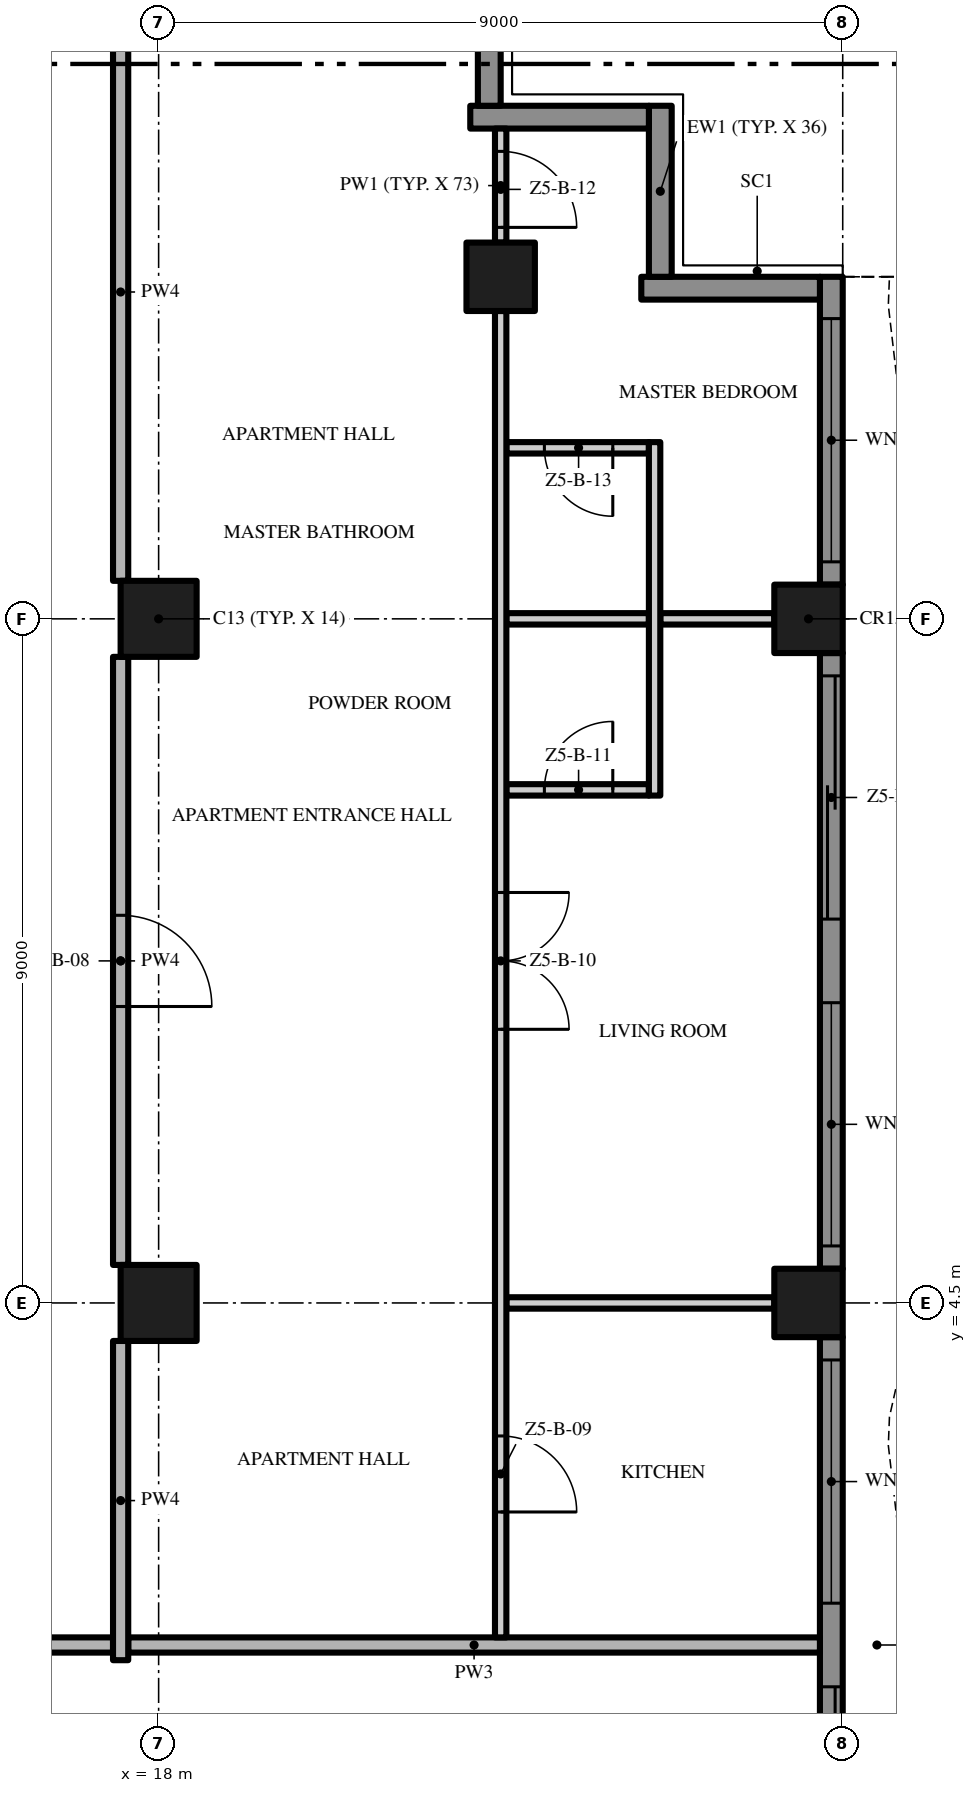
"""IFC4 building model, lengths in metres.
Left out: names, types, materials, properties, quantities, classifications, styles, units other than length and angle.
Written with IfcOpenShell. Run it as: python <this file> out.ifc"""

import sys

from ifc_helpers import new_model, si_unit, direction, frame, frame_2d, origin, origin_2d, place, context, subcontext, project, spatial, polyline, rectangle, outline, extrude, element, fill, save


model = new_model("IFC4")
c1 = context("Model", 3, precision=1e-05, world=origin(), true_north=direction((0.0, 1.0)))
c2 = subcontext(c1, "Body", "Model", "MODEL_VIEW")
j1 = project(units=[si_unit("LENGTHUNIT", "METRE"), si_unit("PLANEANGLEUNIT", "RADIAN")], contexts=[c1])
p1 = place(None, origin())
s1 = spatial("IfcSite", under=j1, at=p1, CompositionType="ELEMENT")
p2 = place(p1, origin())
s2 = spatial("IfcBuilding", under=s1, at=p2, CompositionType="ELEMENT")
p3 = place(p2, frame((0.0, 0.0, 254.0)))
s3 = spatial("IfcBuildingStorey", under=s2, at=p3, CompositionType="ELEMENT", Elevation=254.0)
for number, where, z_axis, x_axis in (
    (1, (18.0, 13.5, 0.0), (0.0, 0.0, 1.0), (1.0, 0.0, 0.0)),
    (2, (18.0, 4.5, 0.0), (0.0, 0.0, 1.0), (1.0, 0.0, 0.0)),
):
    element("IfcColumn", number, at=place(p3, frame(where, z_axis=z_axis, x_axis=x_axis)), inside=s3, PredefinedType="COLUMN", context=c2, shape_type="SweptSolid", body=[
        extrude(rectangle(XDim=1.0, YDim=1.0, at=origin_2d()), origin(), (0.0, 0.0, 1.0), 3.5),
    ])
for number, where, z_axis, x_axis in (
    (3, (26.55, 13.5, 0.0), (0.0, 0.0, 1.0), (1.0, 0.0, 0.0)),
    (4, (22.5, 18.0, 0.0), (0.0, 0.0, 1.0), (1.0, 0.0, 0.0)),
    (5, (26.55, 4.5, 0.0), (0.0, 0.0, 1.0), (1.0, 0.0, 0.0)),
):
    element("IfcColumn", number, at=place(p3, frame(where, z_axis=z_axis, x_axis=x_axis)), inside=s3, PredefinedType="COLUMN", context=c2, shape_type="SweptSolid", body=[
        extrude(rectangle(XDim=0.9, YDim=0.9, at=origin_2d()), origin(), (0.0, 0.0, 1.0), 3.5),
    ])
p4 = place(p3, frame((26.85, 4.05, 0.0), z_axis=(0.0, 0.0, 1.0), x_axis=(0.0, -1.0, 0.0)))
e6 = element("IfcWall", 6, at=p4, inside=s3, PredefinedType="SOLIDWALL", context=c2, shape_type="SweptSolid", body=[
    extrude(rectangle(XDim=8.1, YDim=0.3, at=frame_2d((4.05, 0.0))), origin(), (0.0, 0.0, 1.0), 3.5),
])
p5 = place(p4, frame((4.6, 0.0, 0.0)))
e7 = element("IfcOpeningElement", 7, at=p5, cuts=e6, PredefinedType="OPENING", context=c2, shape_type="SweptSolid", body=[
    extrude(rectangle(XDim=3.2, YDim=2.4, at=frame_2d((1.6, 1.2))), frame((0.0, 0.16, 0.0), z_axis=(0.0, -1.0, 0.0), x_axis=(1.0, 0.0, 0.0)), (0.0, 0.0, 1.0), 0.32),
])
p6 = place(p4, frame((0.3, 0.0, 0.45)))
e8 = element("IfcOpeningElement", 8, at=p6, cuts=e6, PredefinedType="OPENING", context=c2, shape_type="SweptSolid", body=[
    extrude(rectangle(XDim=3.2, YDim=2.65, at=frame_2d((1.6, 1.325))), frame((0.0, 0.16, 0.0), z_axis=(0.0, -1.0, 0.0), x_axis=(1.0, 0.0, 0.0)), (0.0, 0.0, 1.0), 0.32),
])
p7 = place(p3, frame((26.85, 13.05, 0.0), z_axis=(0.0, 0.0, 1.0), x_axis=(0.0, -1.0, 0.0)))
e9 = element("IfcWall", 9, at=p7, inside=s3, PredefinedType="SOLIDWALL", context=c2, shape_type="SweptSolid", body=[
    extrude(rectangle(XDim=8.1, YDim=0.3, at=frame_2d((4.05, 0.0))), origin(), (0.0, 0.0, 1.0), 3.5),
])
p8 = place(p7, frame((4.6, 0.0, 0.45)))
e10 = element("IfcOpeningElement", 10, at=p8, cuts=e9, PredefinedType="OPENING", context=c2, shape_type="SweptSolid", body=[
    extrude(rectangle(XDim=3.2, YDim=2.65, at=frame_2d((1.6, 1.325))), frame((0.0, 0.16, 0.0), z_axis=(0.0, -1.0, 0.0), x_axis=(1.0, 0.0, 0.0)), (0.0, 0.0, 1.0), 0.32),
])
p9 = place(p7, frame((0.3, 0.0, 0.0)))
e11 = element("IfcOpeningElement", 11, at=p9, cuts=e9, PredefinedType="OPENING", context=c2, shape_type="SweptSolid", body=[
    extrude(rectangle(XDim=3.2, YDim=2.4, at=frame_2d((1.6, 1.2))), frame((0.0, 0.16, 0.0), z_axis=(0.0, -1.0, 0.0), x_axis=(1.0, 0.0, 0.0)), (0.0, 0.0, 1.0), 0.32),
])
p10 = place(p3, frame((26.85, 18.0, 0.0), z_axis=(0.0, 0.0, 1.0), x_axis=(0.0, -1.0, 0.0)))
e12 = element("IfcWall", 12, at=p10, inside=s3, PredefinedType="SOLIDWALL", context=c2, shape_type="SweptSolid", body=[
    extrude(rectangle(XDim=4.05, YDim=0.3, at=frame_2d((2.025, 0.0))), origin(), (0.0, 0.0, 1.0), 3.5),
])
p11 = place(p10, frame((0.55, 0.0, 0.45)))
e13 = element("IfcOpeningElement", 13, at=p11, cuts=e12, PredefinedType="OPENING", context=c2, shape_type="SweptSolid", body=[
    extrude(rectangle(XDim=3.2, YDim=2.65, at=frame_2d((1.6, 1.325))), frame((0.0, 0.16, 0.0), z_axis=(0.0, -1.0, 0.0), x_axis=(1.0, 0.0, 0.0)), (0.0, 0.0, 1.0), 0.32),
])
p12 = place(p3, frame((24.35, 17.85, 0.0), z_axis=(0.0, 0.0, 1.0), x_axis=(1.0, 0.0, 0.0)))
e14 = element("IfcWall", 14, at=p12, inside=s3, PredefinedType="SOLIDWALL", context=c2, shape_type="SweptSolid", body=[
    extrude(rectangle(XDim=2.35, YDim=0.3, at=frame_2d((1.175, 0.0))), origin(), (0.0, 0.0, 1.0), 3.5),
])
p13 = place(p3, frame((24.6, 20.25, 0.0), z_axis=(0.0, 0.0, 1.0), x_axis=(0.0, -1.0, 0.0)))
e15 = element("IfcWall", 15, at=p13, inside=s3, PredefinedType="SOLIDWALL", context=c2, shape_type="SweptSolid", body=[
    extrude(rectangle(XDim=2.25, YDim=0.3, at=frame_2d((1.125, 0.0))), origin(), (0.0, 0.0, 1.0), 3.5),
])
p14 = place(p3, frame((22.1, 20.1, 0.0), z_axis=(0.0, 0.0, 1.0), x_axis=(1.0, 0.0, 0.0)))
e16 = element("IfcWall", 16, at=p14, inside=s3, PredefinedType="SOLIDWALL", context=c2, shape_type="SweptSolid", body=[
    extrude(rectangle(XDim=2.35, YDim=0.3, at=frame_2d((1.175, 0.0))), origin(), (0.0, 0.0, 1.0), 3.5),
])
p15 = place(p3, frame((22.35, 22.5, 0.0), z_axis=(0.0, 0.0, 1.0), x_axis=(0.0, -1.0, 0.0)))
e17 = element("IfcWall", 17, at=p15, inside=s3, PredefinedType="SOLIDWALL", context=c2, shape_type="SweptSolid", body=[
    extrude(rectangle(XDim=2.25, YDim=0.3, at=frame_2d((1.125, 0.0))), origin(), (0.0, 0.0, 1.0), 3.5),
])
p16 = place(p3, origin())
e18 = element("IfcWall", 18, at=p16, inside=s3, PredefinedType="USERDEFINED", context=c2, shape_type="SweptSolid", body=[
    extrude(outline(polyline([(29.649, -18.0), (28.988, -16.5), (28.255, -15.0), (27.731, -13.5), (27.6, -12.375), (27.615, -12.0), (27.951, -10.5), (28.612, -9.0), (29.345, -7.5), (29.869, -6.0), (30.0, -4.875), (29.985, -4.5), (29.649, -3.0), (28.988, -1.5), (28.255, 0.0), (27.731, 1.5), (27.6, 2.625), (27.615, 3.0), (27.951, 4.5), (28.612, 6.0), (29.345, 7.5), (29.869, 9.0), (30.0, 10.125), (29.985, 10.5), (29.649, 12.0), (28.988, 13.5), (28.255, 15.0), (27.731, 16.5), (27.6, 17.625), (27.615, 18.0), (27.365, 18.01), (27.349, 17.615), (27.486, 16.444), (28.024, 14.904), (28.761, 13.395), (29.41, 11.921), (29.736, 10.467), (29.749, 10.135), (29.624, 9.056), (29.114, 7.596), (28.385, 6.105), (27.713, 4.579), (27.366, 3.033), (27.349, 2.615), (27.486, 1.444), (28.024, -0.096), (28.761, -1.605), (29.41, -3.079), (29.736, -4.533), (29.749, -4.865), (29.624, -5.944), (29.114, -7.404), (28.385, -8.895), (27.713, -10.421), (27.366, -11.967), (27.349, -12.385), (27.486, -13.556), (28.024, -15.096), (28.761, -16.605), (29.42, -18.101), (29.649, -18.0)])), origin(), (0.0, 0.0, 1.0), 0.9),
])
p17 = place(p3, frame((17.4, 0.0, 0.0), z_axis=(0.0, 0.0, 1.0), x_axis=(-1.0, 0.0, 0.0)))
e19 = element("IfcWall", 19, at=p17, inside=s3, PredefinedType="PARTITIONING", context=c2, shape_type="SweptSolid", body=[
    extrude(rectangle(XDim=34.8, YDim=0.2, at=frame_2d((17.4, 0.0))), origin(), (0.0, 0.0, 1.0), 3.5),
])
p18 = place(p17, frame((23.4, 0.0, 0.0)))
e20 = element("IfcOpeningElement", 20, at=p18, cuts=e19, PredefinedType="OPENING", context=c2, shape_type="SweptSolid", body=[
    extrude(rectangle(XDim=1.5, YDim=2.4, at=frame_2d((0.75, 1.2))), frame((0.0, 0.11, 0.0), z_axis=(0.0, -1.0, 0.0), x_axis=(1.0, 0.0, 0.0)), (0.0, 0.0, 1.0), 0.22),
])
p19 = place(p17, frame((5.4, 0.0, 0.0)))
e21 = element("IfcOpeningElement", 21, at=p19, cuts=e19, PredefinedType="OPENING", context=c2, shape_type="SweptSolid", body=[
    extrude(rectangle(XDim=1.5, YDim=2.4, at=frame_2d((0.75, 1.2))), frame((0.0, 0.11, 0.0), z_axis=(0.0, -1.0, 0.0), x_axis=(1.0, 0.0, 0.0)), (0.0, 0.0, 1.0), 0.22),
])
p20 = place(p3, frame((17.6, 0.0, 0.0), z_axis=(0.0, 0.0, 1.0), x_axis=(1.0, 0.0, 0.0)))
e22 = element("IfcWall", 22, at=p20, inside=s3, PredefinedType="PARTITIONING", context=c2, shape_type="SweptSolid", body=[
    extrude(rectangle(XDim=9.1, YDim=0.2, at=frame_2d((4.55, 0.0))), origin(), (0.0, 0.0, 1.0), 3.5),
])
p21 = place(p3, frame((22.575, 4.5, 0.0), z_axis=(0.0, 0.0, 1.0), x_axis=(1.0, 0.0, 0.0)))
e23 = element("IfcWall", 23, at=p21, inside=s3, PredefinedType="PARTITIONING", context=c2, shape_type="SweptSolid", body=[
    extrude(rectangle(XDim=3.525, YDim=0.15, at=frame_2d((1.762, 0.0))), origin(), (0.0, 0.0, 1.0), 3.5),
])
p22 = place(p3, frame((22.575, 11.25, 0.0), z_axis=(0.0, 0.0, 1.0), x_axis=(1.0, 0.0, 0.0)))
e24 = element("IfcWall", 24, at=p22, inside=s3, PredefinedType="PARTITIONING", context=c2, shape_type="SweptSolid", body=[
    extrude(rectangle(XDim=1.875, YDim=0.15, at=frame_2d((0.938, 0.0))), origin(), (0.0, 0.0, 1.0), 3.5),
])
p23 = place(p22, frame((0.5, 0.0, 0.0)))
e25 = element("IfcOpeningElement", 25, at=p23, cuts=e24, PredefinedType="OPENING", context=c2, shape_type="SweptSolid", body=[
    extrude(rectangle(XDim=0.9, YDim=2.1, at=frame_2d((0.45, 1.05))), frame((0.0, 0.085, 0.0), z_axis=(0.0, -1.0, 0.0), x_axis=(1.0, 0.0, 0.0)), (0.0, 0.0, 1.0), 0.17),
])
p24 = place(p3, frame((22.575, 13.5, 0.0), z_axis=(0.0, 0.0, 1.0), x_axis=(1.0, 0.0, 0.0)))
e26 = element("IfcWall", 26, at=p24, inside=s3, PredefinedType="PARTITIONING", context=c2, shape_type="SweptSolid", body=[
    extrude(rectangle(XDim=1.875, YDim=0.15, at=frame_2d((0.938, 0.0))), origin(), (0.0, 0.0, 1.0), 3.5),
])
p25 = place(p3, frame((24.6, 13.5, 0.0), z_axis=(0.0, 0.0, 1.0), x_axis=(1.0, 0.0, 0.0)))
e27 = element("IfcWall", 27, at=p25, inside=s3, PredefinedType="PARTITIONING", context=c2, shape_type="SweptSolid", body=[
    extrude(rectangle(XDim=1.5, YDim=0.15, at=frame_2d((0.75, 0.0))), origin(), (0.0, 0.0, 1.0), 3.5),
])
p26 = place(p3, frame((24.45, 15.75, 0.0), z_axis=(0.0, 0.0, 1.0), x_axis=(-1.0, 0.0, 0.0)))
e28 = element("IfcWall", 28, at=p26, inside=s3, PredefinedType="PARTITIONING", context=c2, shape_type="SweptSolid", body=[
    extrude(rectangle(XDim=1.875, YDim=0.15, at=frame_2d((0.938, 0.0))), origin(), (0.0, 0.0, 1.0), 3.5),
])
p27 = place(p26, frame((0.475, 0.0, 0.0)))
e29 = element("IfcOpeningElement", 29, at=p27, cuts=e28, PredefinedType="OPENING", context=c2, shape_type="SweptSolid", body=[
    extrude(rectangle(XDim=0.9, YDim=2.1, at=frame_2d((0.45, 1.05))), frame((0.0, 0.085, 0.0), z_axis=(0.0, -1.0, 0.0), x_axis=(1.0, 0.0, 0.0)), (0.0, 0.0, 1.0), 0.17),
])
p28 = place(p3, frame((17.5, -0.2, 0.0), z_axis=(0.0, 0.0, 1.0), x_axis=(0.0, 1.0, 0.0)))
e30 = element("IfcWall", 30, at=p28, inside=s3, PredefinedType="PARTITIONING", context=c2, shape_type="SweptSolid", body=[
    extrude(rectangle(XDim=4.2, YDim=0.2, at=frame_2d((2.1, 0.0))), origin(), (0.0, 0.0, 1.0), 3.5),
])
p29 = place(p3, frame((17.5, 13.0, 0.0), z_axis=(0.0, 0.0, 1.0), x_axis=(0.0, -1.0, 0.0)))
e31 = element("IfcWall", 31, at=p29, inside=s3, PredefinedType="PARTITIONING", context=c2, shape_type="SweptSolid", body=[
    extrude(rectangle(XDim=8.0, YDim=0.2, at=frame_2d((4.0, 0.0))), origin(), (0.0, 0.0, 1.0), 3.5),
])
p30 = place(p29, frame((3.4, 0.0, 0.0)))
e32 = element("IfcOpeningElement", 32, at=p30, cuts=e31, PredefinedType="OPENING", context=c2, shape_type="SweptSolid", body=[
    extrude(rectangle(XDim=1.2, YDim=2.4, at=frame_2d((0.6, 1.2))), frame((0.0, 0.11, 0.0), z_axis=(0.0, -1.0, 0.0), x_axis=(1.0, 0.0, 0.0)), (0.0, 0.0, 1.0), 0.22),
])
p31 = place(p3, frame((17.5, 14.0, 0.0), z_axis=(0.0, 0.0, 1.0), x_axis=(0.0, 1.0, 0.0)))
e33 = element("IfcWall", 33, at=p31, inside=s3, PredefinedType="PARTITIONING", context=c2, shape_type="SweptSolid", body=[
    extrude(rectangle(XDim=7.6, YDim=0.2, at=frame_2d((3.8, 0.0))), origin(), (0.0, 0.0, 1.0), 3.5),
])
p32 = place(p3, frame((22.5, 17.55, 0.0), z_axis=(0.0, 0.0, 1.0), x_axis=(0.0, -1.0, 0.0)))
e34 = element("IfcWall", 34, at=p32, inside=s3, PredefinedType="PARTITIONING", context=c2, shape_type="SweptSolid", body=[
    extrude(rectangle(XDim=17.45, YDim=0.15, at=frame_2d((8.725, 0.0))), origin(), (0.0, 0.0, 1.0), 3.5),
])
p33 = place(p32, frame((14.8, 0.0, 0.0)))
e35 = element("IfcOpeningElement", 35, at=p33, cuts=e34, PredefinedType="OPENING", context=c2, shape_type="SweptSolid", body=[
    extrude(rectangle(XDim=1.0, YDim=2.4, at=frame_2d((0.5, 1.2))), frame((0.0, 0.085, 0.0), z_axis=(0.0, -1.0, 0.0), x_axis=(1.0, 0.0, 0.0)), (0.0, 0.0, 1.0), 0.17),
])
p34 = place(p32, frame((7.65, 0.0, 0.0)))
e36 = element("IfcOpeningElement", 36, at=p34, cuts=e34, PredefinedType="OPENING", context=c2, shape_type="SweptSolid", body=[
    extrude(rectangle(XDim=1.8, YDim=2.4, at=frame_2d((0.9, 1.2))), frame((0.0, 0.085, 0.0), z_axis=(0.0, -1.0, 0.0), x_axis=(1.0, 0.0, 0.0)), (0.0, 0.0, 1.0), 0.17),
])
p35 = place(p3, frame((22.5, 19.95, 0.0), z_axis=(0.0, 0.0, 1.0), x_axis=(0.0, -1.0, 0.0)))
e37 = element("IfcWall", 37, at=p35, inside=s3, PredefinedType="PARTITIONING", context=c2, shape_type="SweptSolid", body=[
    extrude(rectangle(XDim=1.5, YDim=0.15, at=frame_2d((0.75, 0.0))), origin(), (0.0, 0.0, 1.0), 3.5),
])
p36 = place(p35, frame((0.3, 0.0, 0.0)))
e38 = element("IfcOpeningElement", 38, at=p36, cuts=e37, PredefinedType="OPENING", context=c2, shape_type="SweptSolid", body=[
    extrude(rectangle(XDim=1.0, YDim=2.4, at=frame_2d((0.5, 1.2))), frame((0.0, 0.085, 0.0), z_axis=(0.0, -1.0, 0.0), x_axis=(1.0, 0.0, 0.0)), (0.0, 0.0, 1.0), 0.17),
])
p37 = place(p3, frame((24.525, 11.175, 0.0), z_axis=(0.0, 0.0, 1.0), x_axis=(0.0, 1.0, 0.0)))
e39 = element("IfcWall", 39, at=p37, inside=s3, PredefinedType="PARTITIONING", context=c2, shape_type="SweptSolid", body=[
    extrude(rectangle(XDim=4.65, YDim=0.15, at=frame_2d((2.325, 0.0))), origin(), (0.0, 0.0, 1.0), 3.5),
])
p38 = place(p5, origin())
e40 = element("IfcDoor", 40, at=p38, inside=s3, OperationType="SINGLE_SWING_LEFT", PredefinedType="DOOR", context=c2, shape_type="SweptSolid", body=[
    extrude(rectangle(XDim=3.2, YDim=2.4, at=frame_2d((1.6, 1.2))), frame((0.0, 0.025, 0.0), z_axis=(0.0, -1.0, 0.0), x_axis=(1.0, 0.0, 0.0)), (0.0, 0.0, 1.0), 0.05),
])
fill(e7, e40)
p39 = place(p6, origin())
e41 = element("IfcWindow", 41, at=p39, inside=s3, PartitioningType="SINGLE_PANEL", PredefinedType="WINDOW", context=c2, shape_type="SweptSolid", body=[
    extrude(rectangle(XDim=3.2, YDim=2.65, at=frame_2d((1.6, 1.325))), frame((0.0, 0.03, 0.0), z_axis=(0.0, -1.0, 0.0), x_axis=(1.0, 0.0, 0.0)), (0.0, 0.0, 1.0), 0.06),
])
fill(e8, e41)
p40 = place(p8, origin())
e42 = element("IfcWindow", 42, at=p40, inside=s3, PartitioningType="SINGLE_PANEL", PredefinedType="WINDOW", context=c2, shape_type="SweptSolid", body=[
    extrude(rectangle(XDim=3.2, YDim=2.65, at=frame_2d((1.6, 1.325))), frame((0.0, 0.03, 0.0), z_axis=(0.0, -1.0, 0.0), x_axis=(1.0, 0.0, 0.0)), (0.0, 0.0, 1.0), 0.06),
])
fill(e10, e42)
p41 = place(p9, origin())
e43 = element("IfcDoor", 43, at=p41, inside=s3, OperationType="SINGLE_SWING_LEFT", PredefinedType="DOOR", context=c2, shape_type="SweptSolid", body=[
    extrude(rectangle(XDim=3.2, YDim=2.4, at=frame_2d((1.6, 1.2))), frame((0.0, 0.025, 0.0), z_axis=(0.0, -1.0, 0.0), x_axis=(1.0, 0.0, 0.0)), (0.0, 0.0, 1.0), 0.05),
])
fill(e11, e43)
p42 = place(p11, origin())
e44 = element("IfcWindow", 44, at=p42, inside=s3, PartitioningType="SINGLE_PANEL", PredefinedType="WINDOW", context=c2, shape_type="SweptSolid", body=[
    extrude(rectangle(XDim=3.2, YDim=2.65, at=frame_2d((1.6, 1.325))), frame((0.0, 0.03, 0.0), z_axis=(0.0, -1.0, 0.0), x_axis=(1.0, 0.0, 0.0)), (0.0, 0.0, 1.0), 0.06),
])
fill(e13, e44)
p43 = place(p30, origin())
e45 = element("IfcDoor", 45, at=p43, inside=s3, OperationType="SINGLE_SWING_RIGHT", PredefinedType="DOOR", context=c2, shape_type="SweptSolid", body=[
    extrude(rectangle(XDim=1.2, YDim=2.4, at=frame_2d((0.6, 1.2))), frame((0.0, 0.025, 0.0), z_axis=(0.0, -1.0, 0.0), x_axis=(1.0, 0.0, 0.0)), (0.0, 0.0, 1.0), 0.05),
])
fill(e32, e45)
p44 = place(p33, origin())
e46 = element("IfcDoor", 46, at=p44, inside=s3, OperationType="SINGLE_SWING_RIGHT", PredefinedType="DOOR", context=c2, shape_type="SweptSolid", body=[
    extrude(rectangle(XDim=1.0, YDim=2.4, at=frame_2d((0.5, 1.2))), frame((0.0, 0.025, 0.0), z_axis=(0.0, -1.0, 0.0), x_axis=(1.0, 0.0, 0.0)), (0.0, 0.0, 1.0), 0.05),
])
fill(e35, e46)
p45 = place(p34, origin())
e47 = element("IfcDoor", 47, at=p45, inside=s3, OperationType="DOUBLE_DOOR_SINGLE_SWING", PredefinedType="DOOR", context=c2, shape_type="SweptSolid", body=[
    extrude(rectangle(XDim=1.8, YDim=2.4, at=frame_2d((0.9, 1.2))), frame((0.0, 0.025, 0.0), z_axis=(0.0, -1.0, 0.0), x_axis=(1.0, 0.0, 0.0)), (0.0, 0.0, 1.0), 0.05),
])
fill(e36, e47)
p46 = place(p23, origin())
e48 = element("IfcDoor", 48, at=p46, inside=s3, OperationType="SINGLE_SWING_RIGHT", PredefinedType="DOOR", context=c2, shape_type="SweptSolid", body=[
    extrude(rectangle(XDim=0.9, YDim=2.1, at=frame_2d((0.45, 1.05))), frame((0.0, 0.025, 0.0), z_axis=(0.0, -1.0, 0.0), x_axis=(1.0, 0.0, 0.0)), (0.0, 0.0, 1.0), 0.05),
])
fill(e25, e48)
p47 = place(p36, origin())
e49 = element("IfcDoor", 49, at=p47, inside=s3, OperationType="SINGLE_SWING_RIGHT", PredefinedType="DOOR", context=c2, shape_type="SweptSolid", body=[
    extrude(rectangle(XDim=1.0, YDim=2.4, at=frame_2d((0.5, 1.2))), frame((0.0, 0.025, 0.0), z_axis=(0.0, -1.0, 0.0), x_axis=(1.0, 0.0, 0.0)), (0.0, 0.0, 1.0), 0.05),
])
fill(e38, e49)
p48 = place(p27, origin())
e50 = element("IfcDoor", 50, at=p48, inside=s3, OperationType="SINGLE_SWING_LEFT", PredefinedType="DOOR", context=c2, shape_type="SweptSolid", body=[
    extrude(rectangle(XDim=0.9, YDim=2.1, at=frame_2d((0.45, 1.05))), frame((0.0, 0.025, 0.0), z_axis=(0.0, -1.0, 0.0), x_axis=(1.0, 0.0, 0.0)), (0.0, 0.0, 1.0), 0.05),
])
fill(e29, e50)
save(model, sys.argv[1])
